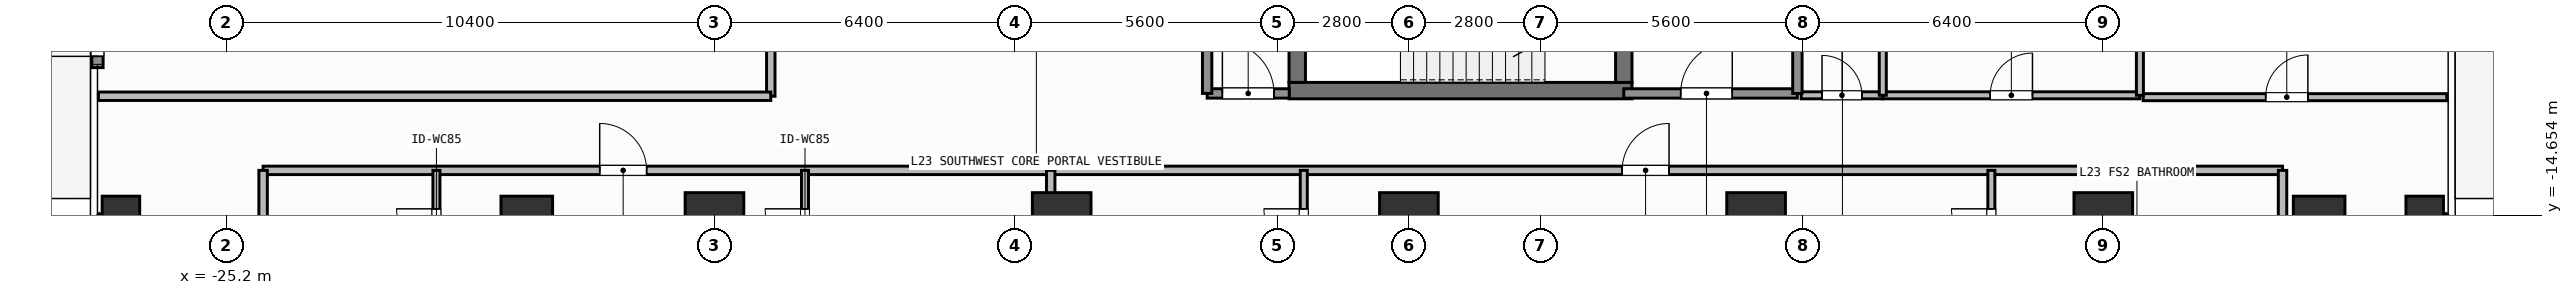
"""IFC4 building model, lengths in metres.
Left out: names, types, materials, properties, quantities, classifications, styles, units other than length and angle.
Written with IfcOpenShell. Run it as: python <this file> out.ifc"""

import sys

from ifc_helpers import new_model, si_unit, direction, frame, frame_2d, origin, origin_2d, place, context, subcontext, project, spatial, rectangle, hollow_rectangle, extrude, element, fill, save


model = new_model("IFC4")
c1 = context("Model", 3, precision=1e-05, world=origin(), true_north=direction((0.0, 1.0)))
c2 = subcontext(c1, "Body", "Model", "MODEL_VIEW")
j1 = project(units=[si_unit("LENGTHUNIT", "METRE"), si_unit("PLANEANGLEUNIT", "RADIAN")], contexts=[c1])
p1 = place(None, origin())
s1 = spatial("IfcSite", under=j1, at=p1, CompositionType="ELEMENT")
p2 = place(p1, origin())
s2 = spatial("IfcBuilding", under=s1, at=p2, CompositionType="ELEMENT")
p3 = place(p2, frame((0.0, 0.0, 93.0)))
s3 = spatial("IfcBuildingStorey", under=s2, at=p3, CompositionType="ELEMENT", Elevation=93.0)
p4 = place(p3, frame((-2.555, -12.0, 0.0), z_axis=(0.0, 0.0, 1.0), x_axis=(1.0, 0.0, 0.0)))
e1 = element("IfcWall", 1, at=p4, inside=s3, PredefinedType="SHEAR", context=c2, shape_type="SweptSolid", body=[
    extrude(rectangle(XDim=7.31, YDim=0.35, at=frame_2d((3.655, 0.0))), origin(), (0.0, 0.0, 1.0), 3.9),
])
p5 = place(p3, frame((-2.38, -11.825, 0.0), z_axis=(0.0, 0.0, 1.0), x_axis=(0.0, 1.0, 0.0)))
e2 = element("IfcWall", 2, at=p5, inside=s3, PredefinedType="SHEAR", context=c2, shape_type="SweptSolid", body=[
    extrude(rectangle(XDim=2.925, YDim=0.35, at=frame_2d((1.462, 0.0))), origin(), (0.0, 0.0, 1.0), 3.9),
])
p6 = place(p3, frame((4.58, -8.9, 0.0), z_axis=(0.0, 0.0, 1.0), x_axis=(0.0, -1.0, 0.0)))
e3 = element("IfcWall", 3, at=p6, inside=s3, PredefinedType="SHEAR", context=c2, shape_type="SweptSolid", body=[
    extrude(rectangle(XDim=2.925, YDim=0.35, at=frame_2d((1.462, 0.0))), origin(), (0.0, 0.0, 1.0), 3.9),
])
p7 = place(p6, frame((0.913, 0.0, 0.0)))
e4 = element("IfcOpeningElement", 4, at=p7, cuts=e3, PredefinedType="OPENING", context=c2, shape_type="SweptSolid", body=[
    extrude(rectangle(XDim=1.1, YDim=2.15, at=frame_2d((0.55, 1.075))), frame((0.0, 0.185, 0.0), z_axis=(0.0, -1.0, 0.0), x_axis=(1.0, 0.0, 0.0)), (0.0, 0.0, 1.0), 0.37),
])
for number, where, z_axis, x_axis in (
    (5, (-14.8, -14.8, 0.0), (0.0, 0.0, 1.0), (1.0, 0.0, 0.0)),
    (6, (-7.4, -14.8, 0.0), (0.0, 0.0, 1.0), (1.0, 0.0, 0.0)),
    (7, (0.0, -14.8, 0.0), (0.0, 0.0, 1.0), (1.0, 0.0, 0.0)),
    (8, (7.4, -14.8, 0.0), (0.0, 0.0, 1.0), (1.0, 0.0, 0.0)),
    (9, (14.8, -14.8, 0.0), (0.0, 0.0, 1.0), (1.0, 0.0, 0.0)),
):
    element("IfcColumn", number, at=place(p3, frame(where, z_axis=z_axis, x_axis=x_axis)), inside=s3, PredefinedType="COLUMN", context=c2, shape_type="SweptSolid", body=[
        extrude(rectangle(XDim=1.25, YDim=1.25, at=origin_2d()), origin(), (0.0, 0.0, 1.0), 3.9),
    ])
for number, where, z_axis, x_axis in (
    (10, (-18.8, -14.8, 0.0), (0.0, 0.0, 1.0), (1.0, 0.0, 0.0)),
    (11, (19.4, -14.8, 0.0), (0.0, 0.0, 1.0), (1.0, 0.0, 0.0)),
):
    element("IfcColumn", number, at=place(p3, frame(where, z_axis=z_axis, x_axis=x_axis)), inside=s3, PredefinedType="COLUMN", context=c2, shape_type="SweptSolid", body=[
        extrude(rectangle(XDim=1.1, YDim=1.1, at=origin_2d()), origin(), (0.0, 0.0, 1.0), 3.9),
    ])
for number, where, z_axis, x_axis in (
    (12, (-27.45, -14.65, 0.0), (0.0, 0.0, 1.0), (1.0, 0.0, 0.0)),
    (13, (21.65, -14.65, 0.0), (0.0, 0.0, 1.0), (1.0, 0.0, 0.0)),
):
    element("IfcColumn", number, at=place(p3, frame(where, z_axis=z_axis, x_axis=x_axis)), inside=s3, PredefinedType="COLUMN", context=c2, shape_type="SweptSolid", body=[
        extrude(hollow_rectangle(XDim=0.8, YDim=0.8, WallThickness=0.036, at=origin_2d()), origin(), (0.0, 0.0, 1.0), 3.9),
    ])
p8 = place(p3, frame((-27.95, -11.51, 0.0), z_axis=(0.0, 0.0, 1.0), x_axis=(0.0, 1.0, 0.0)))
e14 = element("IfcWall", 14, at=p8, inside=s3, PredefinedType="SOLIDWALL", context=c2, shape_type="SweptSolid", body=[
    extrude(rectangle(XDim=1.58, YDim=0.24, at=frame_2d((0.79, 0.0))), origin(), (0.0, 0.0, 1.0), 3.68),
])
p9 = place(p8, frame((0.24, 0.0, 0.0)))
e15 = element("IfcOpeningElement", 15, at=p9, cuts=e14, PredefinedType="OPENING", context=c2, shape_type="SweptSolid", body=[
    extrude(rectangle(XDim=1.1, YDim=2.2, at=frame_2d((0.55, 1.1))), frame((0.0, 0.13, 0.0), z_axis=(0.0, -1.0, 0.0), x_axis=(1.0, 0.0, 0.0)), (0.0, 0.0, 1.0), 0.26),
])
p10 = place(p3, frame((-23.408, -19.292, 0.0), z_axis=(0.0, 0.0, 1.0), x_axis=(-0.707087954376, 0.707125607496, 0.0)))
e16 = element("IfcWall", 16, at=p10, inside=s3, PredefinedType="SOLIDWALL", context=c2, shape_type="SweptSolid", body=[
    extrude(rectangle(XDim=6.484, YDim=0.24, at=frame_2d((3.242, 0.0))), origin(), (0.0, 0.0, 1.0), 3.68),
])
p11 = place(p10, frame((2.492, 0.0, 0.8)))
e17 = element("IfcOpeningElement", 17, at=p11, cuts=e16, PredefinedType="OPENING", context=c2, shape_type="SweptSolid", body=[
    extrude(rectangle(XDim=1.5, YDim=1.85, at=frame_2d((0.75, 0.925))), frame((0.0, 0.13, 0.0), z_axis=(0.0, -1.0, 0.0), x_axis=(1.0, 0.0, 0.0)), (0.0, 0.0, 1.0), 0.26),
])
p12 = place(p3, frame((22.192, -14.708, 0.0), z_axis=(0.0, 0.0, 1.0), x_axis=(-0.707087954376, -0.707125607496, 0.0)))
e18 = element("IfcWall", 18, at=p12, inside=s3, PredefinedType="SOLIDWALL", context=c2, shape_type="SweptSolid", body=[
    extrude(rectangle(XDim=6.484, YDim=0.24, at=frame_2d((3.242, 0.0))), origin(), (0.0, 0.0, 1.0), 3.68),
])
p13 = place(p3, frame((4.58, -12.06, 0.0), z_axis=(0.0, 0.0, 1.0), x_axis=(1.0, 0.0, 0.0)))
e19 = element("IfcWall", 19, at=p13, inside=s3, PredefinedType="SOLIDWALL", context=c2, shape_type="SweptSolid", body=[
    extrude(rectangle(XDim=3.7, YDim=0.2, at=frame_2d((1.85, 0.0))), origin(), (0.0, 0.0, 1.0), 3.68),
])
p14 = place(p13, frame((1.212, 0.0, 0.0)))
e20 = element("IfcOpeningElement", 20, at=p14, cuts=e19, PredefinedType="OPENING", context=c2, shape_type="SweptSolid", body=[
    extrude(rectangle(XDim=1.1, YDim=2.15, at=frame_2d((0.55, 1.075))), frame((0.0, 0.11, 0.0), z_axis=(0.0, -1.0, 0.0), x_axis=(1.0, 0.0, 0.0)), (0.0, 0.0, 1.0), 0.22),
])
p15 = place(p3, frame((-4.3, -12.06, 0.0), z_axis=(0.0, 0.0, 1.0), x_axis=(1.0, 0.0, 0.0)))
e21 = element("IfcWall", 21, at=p15, inside=s3, PredefinedType="SOLIDWALL", context=c2, shape_type="SweptSolid", body=[
    extrude(rectangle(XDim=1.75, YDim=0.2, at=frame_2d((0.875, 0.0))), origin(), (0.0, 0.0, 1.0), 3.68),
])
p16 = place(p15, frame((0.325, 0.0, 0.0)))
e22 = element("IfcOpeningElement", 22, at=p16, cuts=e21, PredefinedType="OPENING", context=c2, shape_type="SweptSolid", body=[
    extrude(rectangle(XDim=1.1, YDim=2.15, at=frame_2d((0.55, 1.075))), frame((0.0, 0.11, 0.0), z_axis=(0.0, -1.0, 0.0), x_axis=(1.0, 0.0, 0.0)), (0.0, 0.0, 1.0), 0.22),
])
p17 = place(p3, frame((8.36, -12.1, 0.0), z_axis=(0.0, 0.0, 1.0), x_axis=(1.0, 0.0, 0.0)))
e23 = element("IfcWall", 23, at=p17, inside=s3, PredefinedType="PARTITIONING", context=c2, shape_type="SweptSolid", body=[
    extrude(rectangle(XDim=1.74, YDim=0.15, at=frame_2d((0.87, 0.0))), origin(), (0.0, 0.0, 1.0), 3.68),
])
p18 = place(p17, frame((0.445, 0.0, 0.0)))
e24 = element("IfcOpeningElement", 24, at=p18, cuts=e23, PredefinedType="OPENING", context=c2, shape_type="SweptSolid", body=[
    extrude(rectangle(XDim=0.85, YDim=2.1, at=frame_2d((0.425, 1.05))), frame((0.0, 0.085, 0.0), z_axis=(0.0, -1.0, 0.0), x_axis=(1.0, 0.0, 0.0)), (0.0, 0.0, 1.0), 0.17),
])
p19 = place(p3, frame((10.1, -12.1, 0.0), z_axis=(0.0, 0.0, 1.0), x_axis=(1.0, 0.0, 0.0)))
e25 = element("IfcWall", 25, at=p19, inside=s3, PredefinedType="PARTITIONING", context=c2, shape_type="SweptSolid", body=[
    extrude(rectangle(XDim=5.48, YDim=0.15, at=frame_2d((2.74, 0.0))), origin(), (0.0, 0.0, 1.0), 3.68),
])
p20 = place(p19, frame((2.29, 0.0, 0.0)))
e26 = element("IfcOpeningElement", 26, at=p20, cuts=e25, PredefinedType="OPENING", context=c2, shape_type="SweptSolid", body=[
    extrude(rectangle(XDim=0.9, YDim=2.1, at=frame_2d((0.45, 1.05))), frame((0.0, 0.085, 0.0), z_axis=(0.0, -1.0, 0.0), x_axis=(1.0, 0.0, 0.0)), (0.0, 0.0, 1.0), 0.17),
])
p21 = place(p3, frame((-24.42, -13.7, 0.0), z_axis=(0.0, 0.0, 1.0), x_axis=(1.0, 0.0, 0.0)))
e27 = element("IfcWall", 27, at=p21, inside=s3, PredefinedType="PARTITIONING", context=c2, shape_type="SweptSolid", body=[
    extrude(rectangle(XDim=16.786, YDim=0.18, at=frame_2d((8.393, 0.0))), origin(), (0.0, 0.0, 1.0), 3.68),
])
p22 = place(p21, frame((7.174, 0.0, 0.0)))
e28 = element("IfcOpeningElement", 28, at=p22, cuts=e27, PredefinedType="OPENING", context=c2, shape_type="SweptSolid", body=[
    extrude(rectangle(XDim=1.0, YDim=2.2, at=frame_2d((0.5, 1.1))), frame((0.0, 0.1, 0.0), z_axis=(0.0, -1.0, 0.0), x_axis=(1.0, 0.0, 0.0)), (0.0, 0.0, 1.0), 0.2),
])
p23 = place(p3, frame((-20.726, -16.19, 0.0), z_axis=(0.0, 0.0, 1.0), x_axis=(0.0, 1.0, 0.0)))
e29 = element("IfcWall", 29, at=p23, inside=s3, PredefinedType="PARTITIONING", context=c2, shape_type="SweptSolid", body=[
    extrude(rectangle(XDim=2.49, YDim=0.15, at=frame_2d((1.245, 0.0))), origin(), (0.0, 0.0, 1.0), 3.68),
])
p24 = place(p23, frame((0.82, 0.0, 0.0)))
e30 = element("IfcOpeningElement", 30, at=p24, cuts=e29, PredefinedType="OPENING", context=c2, shape_type="SweptSolid", body=[
    extrude(rectangle(XDim=0.85, YDim=2.1, at=frame_2d((0.425, 1.05))), frame((0.0, 0.085, 0.0), z_axis=(0.0, -1.0, 0.0), x_axis=(1.0, 0.0, 0.0)), (0.0, 0.0, 1.0), 0.17),
])
p25 = place(p3, frame((-12.871, -16.19, 0.0), z_axis=(0.0, 0.0, 1.0), x_axis=(0.0, 1.0, 0.0)))
e31 = element("IfcWall", 31, at=p25, inside=s3, PredefinedType="PARTITIONING", context=c2, shape_type="SweptSolid", body=[
    extrude(rectangle(XDim=2.49, YDim=0.15, at=frame_2d((1.245, 0.0))), origin(), (0.0, 0.0, 1.0), 3.68),
])
p26 = place(p25, frame((0.82, 0.0, 0.0)))
e32 = element("IfcOpeningElement", 32, at=p26, cuts=e31, PredefinedType="OPENING", context=c2, shape_type="SweptSolid", body=[
    extrude(rectangle(XDim=0.85, YDim=2.1, at=frame_2d((0.425, 1.05))), frame((0.0, 0.085, 0.0), z_axis=(0.0, -1.0, 0.0), x_axis=(1.0, 0.0, 0.0)), (0.0, 0.0, 1.0), 0.17),
])
p27 = place(p3, frame((-7.634, -13.7, 0.0), z_axis=(0.0, 0.0, 1.0), x_axis=(1.0, 0.0, 0.0)))
e33 = element("IfcWall", 33, at=p27, inside=s3, PredefinedType="PARTITIONING", context=c2, shape_type="SweptSolid", body=[
    extrude(rectangle(XDim=26.254, YDim=0.18, at=frame_2d((13.127, 0.0))), origin(), (0.0, 0.0, 1.0), 3.68),
])
p28 = place(p27, frame((12.178, 0.0, 0.0)))
e34 = element("IfcOpeningElement", 34, at=p28, cuts=e33, PredefinedType="OPENING", context=c2, shape_type="SweptSolid", body=[
    extrude(rectangle(XDim=1.0, YDim=2.2, at=frame_2d((0.5, 1.1))), frame((0.0, 0.1, 0.0), z_axis=(0.0, -1.0, 0.0), x_axis=(1.0, 0.0, 0.0)), (0.0, 0.0, 1.0), 0.2),
])
p29 = place(p3, frame((-2.24, -16.19, 0.0), z_axis=(0.0, 0.0, 1.0), x_axis=(0.0, 1.0, 0.0)))
e35 = element("IfcWall", 35, at=p29, inside=s3, PredefinedType="PARTITIONING", context=c2, shape_type="SweptSolid", body=[
    extrude(rectangle(XDim=2.49, YDim=0.15, at=frame_2d((1.245, 0.0))), origin(), (0.0, 0.0, 1.0), 3.68),
])
p30 = place(p29, frame((0.82, 0.0, 0.0)))
e36 = element("IfcOpeningElement", 36, at=p30, cuts=e35, PredefinedType="OPENING", context=c2, shape_type="SweptSolid", body=[
    extrude(rectangle(XDim=0.85, YDim=2.1, at=frame_2d((0.425, 1.05))), frame((0.0, 0.085, 0.0), z_axis=(0.0, -1.0, 0.0), x_axis=(1.0, 0.0, 0.0)), (0.0, 0.0, 1.0), 0.17),
])
p31 = place(p3, frame((12.414, -16.19, 0.0), z_axis=(0.0, 0.0, 1.0), x_axis=(0.0, 1.0, 0.0)))
e37 = element("IfcWall", 37, at=p31, inside=s3, PredefinedType="PARTITIONING", context=c2, shape_type="SweptSolid", body=[
    extrude(rectangle(XDim=2.49, YDim=0.15, at=frame_2d((1.245, 0.0))), origin(), (0.0, 0.0, 1.0), 3.68),
])
p32 = place(p31, frame((0.82, 0.0, 0.0)))
e38 = element("IfcOpeningElement", 38, at=p32, cuts=e37, PredefinedType="OPENING", context=c2, shape_type="SweptSolid", body=[
    extrude(rectangle(XDim=0.85, YDim=2.1, at=frame_2d((0.425, 1.05))), frame((0.0, 0.085, 0.0), z_axis=(0.0, -1.0, 0.0), x_axis=(1.0, 0.0, 0.0)), (0.0, 0.0, 1.0), 0.17),
])
p33 = place(p3, frame((-13.6, -12.12, 0.0), z_axis=(0.0, 0.0, 1.0), x_axis=(0.0, 1.0, 0.0)))
e39 = element("IfcWall", 39, at=p33, inside=s3, PredefinedType="PARTITIONING", context=c2, shape_type="SweptSolid", body=[
    extrude(rectangle(XDim=9.389, YDim=0.18, at=frame_2d((4.695, 0.0))), origin(), (0.0, 0.0, 1.0), 3.68),
])
p34 = place(p33, frame((1.415, 0.0, 0.0)))
e40 = element("IfcOpeningElement", 40, at=p34, cuts=e39, PredefinedType="OPENING", context=c2, shape_type="SweptSolid", body=[
    extrude(rectangle(XDim=1.0, YDim=2.2, at=frame_2d((0.5, 1.1))), frame((0.0, 0.1, 0.0), z_axis=(0.0, -1.0, 0.0), x_axis=(1.0, 0.0, 0.0)), (0.0, 0.0, 1.0), 0.2),
])
p35 = place(p3, frame((15.65, -12.14, 0.0), z_axis=(0.0, 0.0, 1.0), x_axis=(1.0, 0.0, 0.0)))
e41 = element("IfcWall", 41, at=p35, inside=s3, PredefinedType="PARTITIONING", context=c2, shape_type="SweptSolid", body=[
    extrude(rectangle(XDim=6.47, YDim=0.15, at=frame_2d((3.235, 0.0))), origin(), (0.0, 0.0, 1.0), 3.68),
])
p36 = place(p35, frame((2.61, 0.0, 0.0)))
e42 = element("IfcOpeningElement", 42, at=p36, cuts=e41, PredefinedType="OPENING", context=c2, shape_type="SweptSolid", body=[
    extrude(rectangle(XDim=0.9, YDim=2.1, at=frame_2d((0.45, 1.05))), frame((0.0, 0.085, 0.0), z_axis=(0.0, -1.0, 0.0), x_axis=(1.0, 0.0, 0.0)), (0.0, 0.0, 1.0), 0.17),
])
for number, where, z_axis, x_axis in (
    (43, (8.28, -12.06, 0.0), (0.0, 0.0, 1.0), (0.0, 1.0, 0.0)),
    (44, (-4.3, -12.06, 0.0), (0.0, 0.0, 1.0), (0.0, 1.0, 0.0)),
):
    element("IfcWall", number, at=place(p3, frame(where, z_axis=z_axis, x_axis=x_axis)), inside=s3, PredefinedType="SOLIDWALL", context=c2, shape_type="SweptSolid", body=[
        extrude(rectangle(XDim=3.185, YDim=0.2, at=frame_2d((1.593, 0.0))), origin(), (0.0, 0.0, 1.0), 3.68),
    ])
p37 = place(p3, frame((10.1, -12.1, 0.0), z_axis=(0.0, 0.0, 1.0), x_axis=(0.0, 1.0, 0.0)))
e45 = element("IfcWall", 45, at=p37, inside=s3, PredefinedType="PARTITIONING", context=c2, shape_type="SweptSolid", body=[
    extrude(rectangle(XDim=2.35, YDim=0.15, at=frame_2d((1.175, 0.0))), origin(), (0.0, 0.0, 1.0), 3.68),
])
p38 = place(p3, frame((15.58, -12.1, 0.0), z_axis=(0.0, 0.0, 1.0), x_axis=(0.0, 1.0, 0.0)))
e46 = element("IfcWall", 46, at=p38, inside=s3, PredefinedType="PARTITIONING", context=c2, shape_type="SweptSolid", body=[
    extrude(rectangle(XDim=6.25, YDim=0.15, at=frame_2d((3.125, 0.0))), origin(), (0.0, 0.0, 1.0), 3.68),
])
for number, where, z_axis, x_axis in (
    (47, (-24.42, -18.11, 0.0), (0.0, 0.0, 1.0), (0.0, 1.0, 0.0)),
    (48, (18.62, -18.11, 0.0), (0.0, 0.0, 1.0), (0.0, 1.0, 0.0)),
):
    element("IfcWall", number, at=place(p3, frame(where, z_axis=z_axis, x_axis=x_axis)), inside=s3, PredefinedType="PARTITIONING", context=c2, shape_type="SweptSolid", body=[
        extrude(rectangle(XDim=4.41, YDim=0.18, at=frame_2d((2.205, 0.0))), origin(), (0.0, 0.0, 1.0), 3.68),
    ])
p39 = place(p3, frame((-7.634, -19.23, 0.0), z_axis=(0.0, 0.0, 1.0), x_axis=(0.0, 1.0, 0.0)))
e49 = element("IfcWall", 49, at=p39, inside=s3, PredefinedType="PARTITIONING", context=c2, shape_type="SweptSolid", body=[
    extrude(rectangle(XDim=5.53, YDim=0.18, at=frame_2d((2.765, 0.0))), origin(), (0.0, 0.0, 1.0), 3.082),
])
p40 = place(p3, frame((-27.93, -12.12, 0.0), z_axis=(0.0, 0.0, 1.0), x_axis=(1.0, 0.0, 0.0)))
e50 = element("IfcWall", 50, at=p40, inside=s3, PredefinedType="PARTITIONING", context=c2, shape_type="SweptSolid", body=[
    extrude(rectangle(XDim=14.33, YDim=0.18, at=frame_2d((7.165, 0.0))), origin(), (0.0, 0.0, 1.0), 3.68),
])
p41 = place(p9, origin())
e51 = element("IfcDoor", 51, at=p41, inside=s3, OperationType="SINGLE_SWING_LEFT", PredefinedType="DOOR", context=c2, shape_type="SweptSolid", body=[
    extrude(rectangle(XDim=1.1, YDim=2.2, at=frame_2d((0.55, 1.1))), frame((0.0, 0.025, 0.0), z_axis=(0.0, -1.0, 0.0), x_axis=(1.0, 0.0, 0.0)), (0.0, 0.0, 1.0), 0.05),
])
fill(e15, e51)
p42 = place(p14, origin())
e52 = element("IfcDoor", 52, at=p42, inside=s3, OperationType="SINGLE_SWING_RIGHT", PredefinedType="DOOR", context=c2, shape_type="SweptSolid", body=[
    extrude(rectangle(XDim=1.1, YDim=2.15, at=frame_2d((0.55, 1.075))), frame((0.0, 0.025, 0.0), z_axis=(0.0, -1.0, 0.0), x_axis=(1.0, 0.0, 0.0)), (0.0, 0.0, 1.0), 0.05),
])
fill(e20, e52)
p43 = place(p16, origin())
e53 = element("IfcDoor", 53, at=p43, inside=s3, OperationType="SINGLE_SWING_LEFT", PredefinedType="DOOR", context=c2, shape_type="SweptSolid", body=[
    extrude(rectangle(XDim=1.1, YDim=2.15, at=frame_2d((0.55, 1.075))), frame((0.0, 0.025, 0.0), z_axis=(0.0, -1.0, 0.0), x_axis=(1.0, 0.0, 0.0)), (0.0, 0.0, 1.0), 0.05),
])
fill(e22, e53)
p44 = place(p18, origin())
e54 = element("IfcDoor", 54, at=p44, inside=s3, OperationType="SINGLE_SWING_LEFT", PredefinedType="DOOR", context=c2, shape_type="SweptSolid", body=[
    extrude(rectangle(XDim=0.85, YDim=2.1, at=frame_2d((0.425, 1.05))), frame((0.0, 0.025, 0.0), z_axis=(0.0, -1.0, 0.0), x_axis=(1.0, 0.0, 0.0)), (0.0, 0.0, 1.0), 0.05),
])
fill(e24, e54)
p45 = place(p20, origin())
e55 = element("IfcDoor", 55, at=p45, inside=s3, OperationType="SINGLE_SWING_RIGHT", PredefinedType="DOOR", context=c2, shape_type="SweptSolid", body=[
    extrude(rectangle(XDim=0.9, YDim=2.1, at=frame_2d((0.45, 1.05))), frame((0.0, 0.025, 0.0), z_axis=(0.0, -1.0, 0.0), x_axis=(1.0, 0.0, 0.0)), (0.0, 0.0, 1.0), 0.05),
])
fill(e26, e55)
p46 = place(p22, origin())
e56 = element("IfcDoor", 56, at=p46, inside=s3, OperationType="SINGLE_SWING_LEFT", PredefinedType="DOOR", context=c2, shape_type="SweptSolid", body=[
    extrude(rectangle(XDim=1.0, YDim=2.2, at=frame_2d((0.5, 1.1))), frame((0.0, 0.025, 0.0), z_axis=(0.0, -1.0, 0.0), x_axis=(1.0, 0.0, 0.0)), (0.0, 0.0, 1.0), 0.05),
])
fill(e28, e56)
p47 = place(p24, origin())
e57 = element("IfcDoor", 57, at=p47, inside=s3, OperationType="SINGLE_SWING_RIGHT", PredefinedType="DOOR", context=c2, shape_type="SweptSolid", body=[
    extrude(rectangle(XDim=0.85, YDim=2.1, at=frame_2d((0.425, 1.05))), frame((0.0, 0.025, 0.0), z_axis=(0.0, -1.0, 0.0), x_axis=(1.0, 0.0, 0.0)), (0.0, 0.0, 1.0), 0.05),
])
fill(e30, e57)
p48 = place(p26, origin())
e58 = element("IfcDoor", 58, at=p48, inside=s3, OperationType="SINGLE_SWING_RIGHT", PredefinedType="DOOR", context=c2, shape_type="SweptSolid", body=[
    extrude(rectangle(XDim=0.85, YDim=2.1, at=frame_2d((0.425, 1.05))), frame((0.0, 0.025, 0.0), z_axis=(0.0, -1.0, 0.0), x_axis=(1.0, 0.0, 0.0)), (0.0, 0.0, 1.0), 0.05),
])
fill(e32, e58)
p49 = place(p28, origin())
e59 = element("IfcDoor", 59, at=p49, inside=s3, OperationType="SINGLE_SWING_RIGHT", PredefinedType="DOOR", context=c2, shape_type="SweptSolid", body=[
    extrude(rectangle(XDim=1.0, YDim=2.2, at=frame_2d((0.5, 1.1))), frame((0.0, 0.025, 0.0), z_axis=(0.0, -1.0, 0.0), x_axis=(1.0, 0.0, 0.0)), (0.0, 0.0, 1.0), 0.05),
])
fill(e34, e59)
p50 = place(p30, origin())
e60 = element("IfcDoor", 60, at=p50, inside=s3, OperationType="SINGLE_SWING_RIGHT", PredefinedType="DOOR", context=c2, shape_type="SweptSolid", body=[
    extrude(rectangle(XDim=0.85, YDim=2.1, at=frame_2d((0.425, 1.05))), frame((0.0, 0.025, 0.0), z_axis=(0.0, -1.0, 0.0), x_axis=(1.0, 0.0, 0.0)), (0.0, 0.0, 1.0), 0.05),
])
fill(e36, e60)
p51 = place(p32, origin())
e61 = element("IfcDoor", 61, at=p51, inside=s3, OperationType="SINGLE_SWING_RIGHT", PredefinedType="DOOR", context=c2, shape_type="SweptSolid", body=[
    extrude(rectangle(XDim=0.85, YDim=2.1, at=frame_2d((0.425, 1.05))), frame((0.0, 0.025, 0.0), z_axis=(0.0, -1.0, 0.0), x_axis=(1.0, 0.0, 0.0)), (0.0, 0.0, 1.0), 0.05),
])
fill(e38, e61)
p52 = place(p36, origin())
e62 = element("IfcDoor", 62, at=p52, inside=s3, OperationType="SINGLE_SWING_RIGHT", PredefinedType="DOOR", context=c2, shape_type="SweptSolid", body=[
    extrude(rectangle(XDim=0.9, YDim=2.1, at=frame_2d((0.45, 1.05))), frame((0.0, 0.025, 0.0), z_axis=(0.0, -1.0, 0.0), x_axis=(1.0, 0.0, 0.0)), (0.0, 0.0, 1.0), 0.05),
])
fill(e42, e62)
save(model, sys.argv[1])
